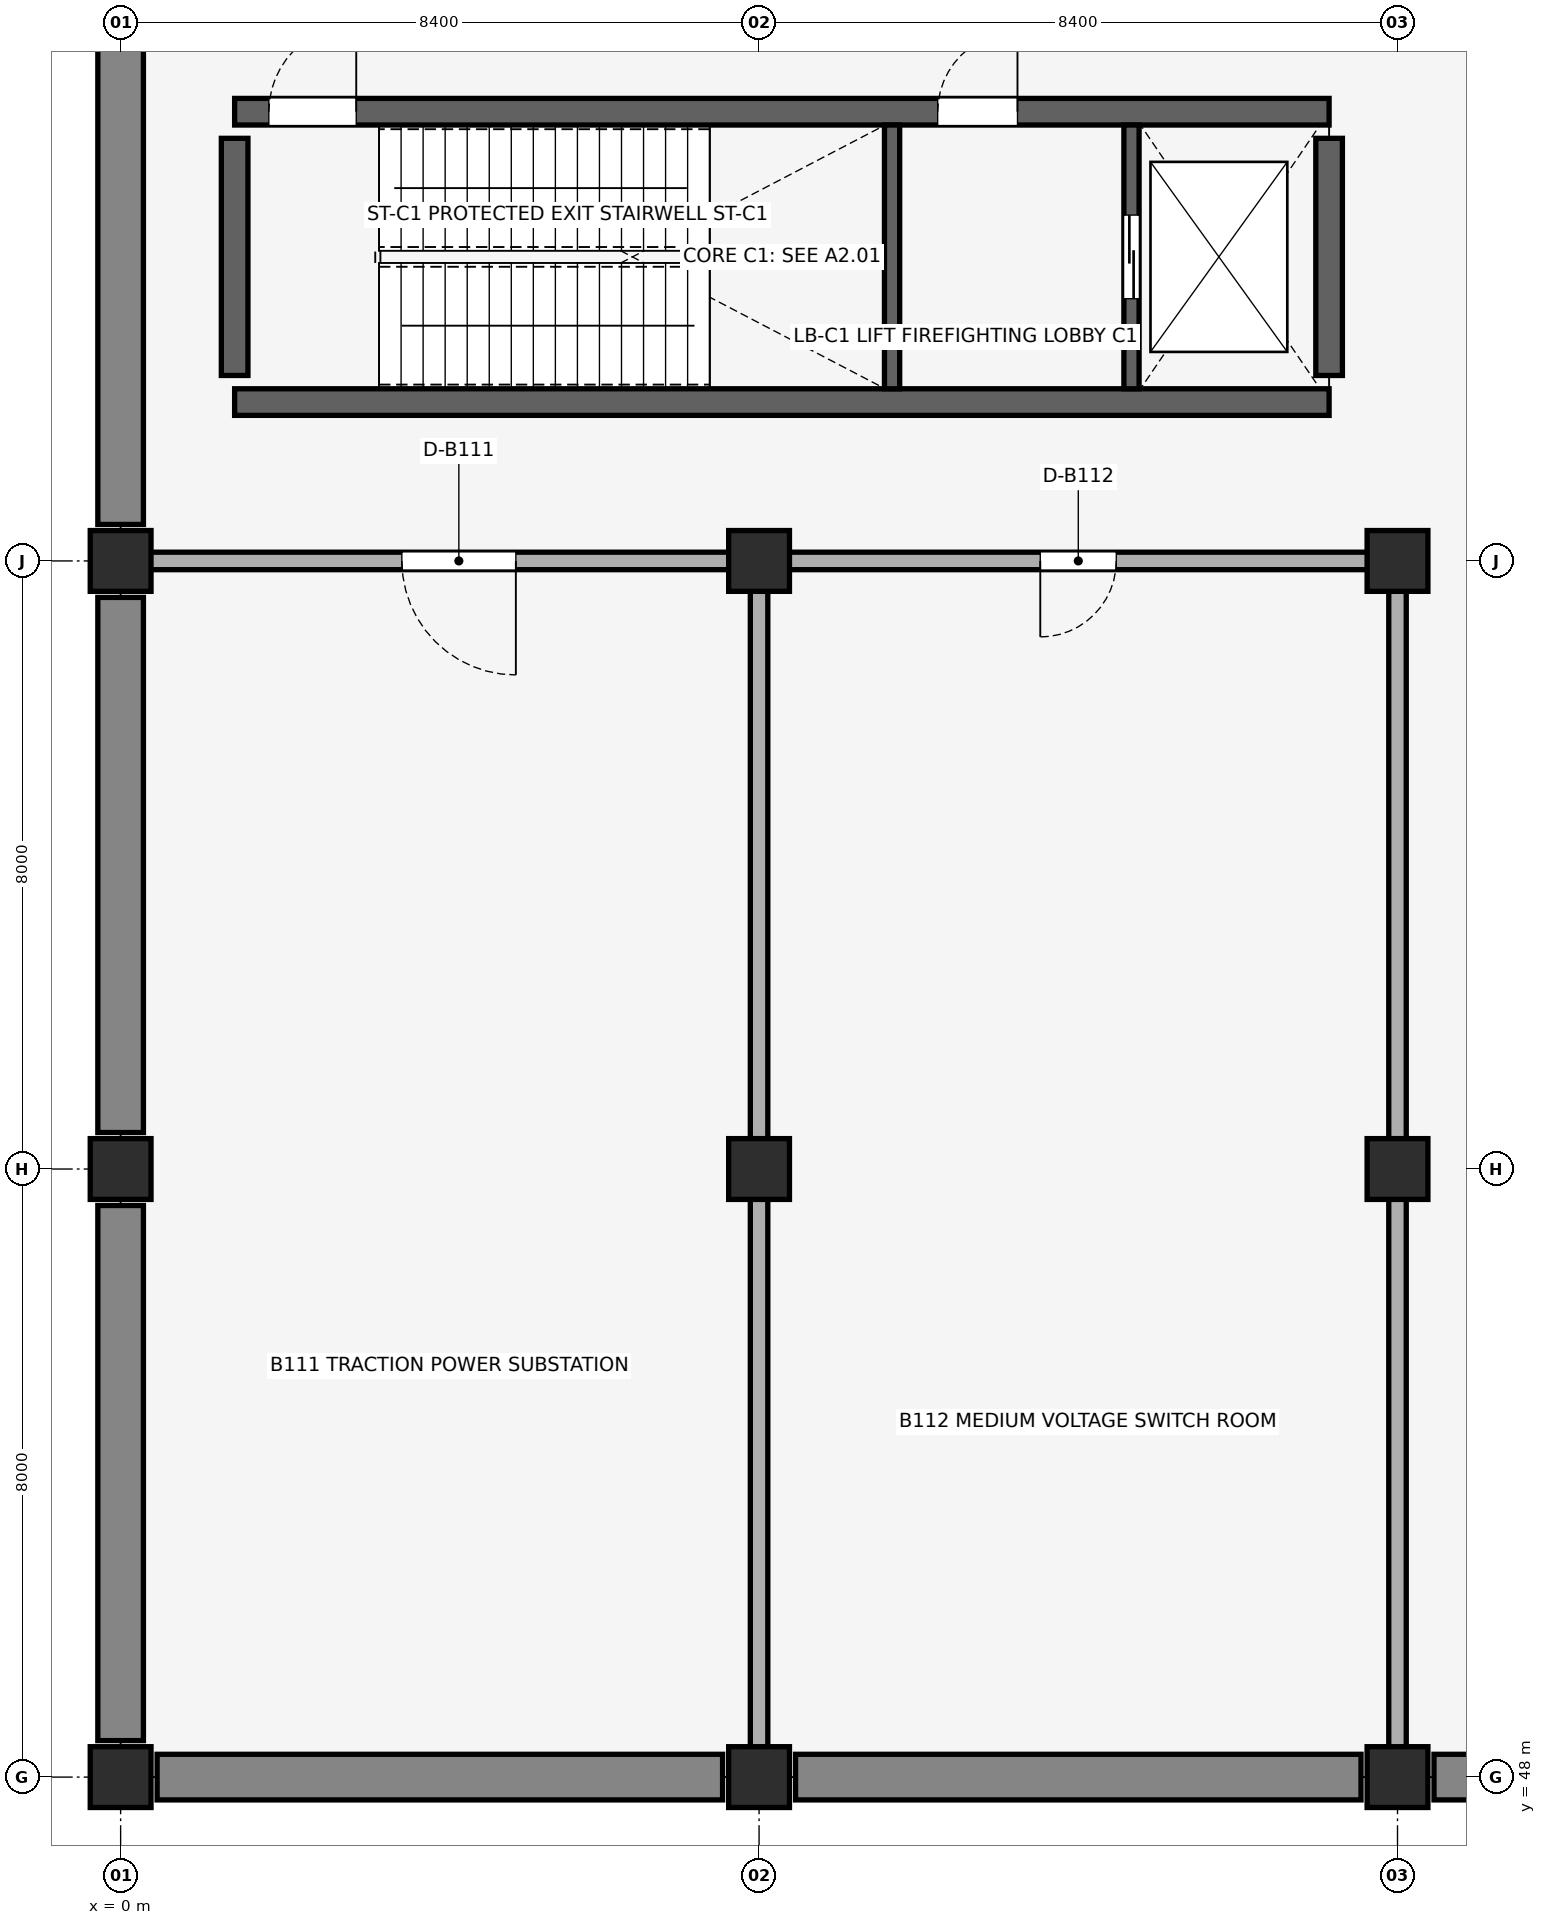
"""IFC4 building model, lengths in metres.
Left out: names, types, materials, properties, quantities, classifications, styles, units other than length and angle.
Written with IfcOpenShell. Run it as: python <this file> out.ifc"""

import sys

from ifc_helpers import new_model, si_unit, direction, frame, frame_2d, origin, origin_2d, place, context, subcontext, project, spatial, rectangle, extrude, element, fill, save


model = new_model("IFC4")
c1 = context("Model", 3, precision=1e-05, world=origin(), true_north=direction((0.0, 1.0)))
c2 = subcontext(c1, "Body", "Model", "MODEL_VIEW")
j1 = project(units=[si_unit("LENGTHUNIT", "METRE"), si_unit("PLANEANGLEUNIT", "RADIAN")], contexts=[c1])
p1 = place(None, origin())
s1 = spatial("IfcSite", under=j1, at=p1, CompositionType="ELEMENT")
p2 = place(p1, origin())
s2 = spatial("IfcBuilding", under=s1, at=p2, CompositionType="ELEMENT")
p3 = place(p2, frame((0.0, 0.0, -5.44)))
s3 = spatial("IfcBuildingStorey", under=s2, at=p3, CompositionType="ELEMENT", Elevation=-5.44)
p4 = place(p3, frame((0.48, 48.0, 0.0), z_axis=(0.0, 0.0, 1.0), x_axis=(1.0, 0.0, 0.0)))
e1 = element("IfcWall", 1, at=p4, inside=s3, PredefinedType="SOLIDWALL", context=c2, shape_type="SweptSolid", body=[
    extrude(rectangle(XDim=7.44, YDim=0.6, at=frame_2d((3.72, 0.0))), origin(), (0.0, 0.0, 1.0), 5.02),
])
p5 = place(p3, frame((8.88, 48.0, 0.0), z_axis=(0.0, 0.0, 1.0), x_axis=(1.0, 0.0, 0.0)))
e2 = element("IfcWall", 2, at=p5, inside=s3, PredefinedType="SOLIDWALL", context=c2, shape_type="SweptSolid", body=[
    extrude(rectangle(XDim=7.44, YDim=0.6, at=frame_2d((3.72, 0.0))), origin(), (0.0, 0.0, 1.0), 5.02),
])
p6 = place(p3, frame((17.28, 48.0, 0.0), z_axis=(0.0, 0.0, 1.0), x_axis=(1.0, 0.0, 0.0)))
e3 = element("IfcWall", 3, at=p6, inside=s3, PredefinedType="SOLIDWALL", context=c2, shape_type="SweptSolid", body=[
    extrude(rectangle(XDim=7.44, YDim=0.6, at=frame_2d((3.72, 0.0))), origin(), (0.0, 0.0, 1.0), 5.02),
])
for number, where, z_axis, x_axis in (
    (4, (0.0, 48.48, 0.0), (0.0, 0.0, 1.0), (0.0, 1.0, 0.0)),
    (5, (0.0, 56.48, 0.0), (0.0, 0.0, 1.0), (0.0, 1.0, 0.0)),
    (6, (0.0, 64.48, 0.0), (0.0, 0.0, 1.0), (0.0, 1.0, 0.0)),
):
    element("IfcWall", number, at=place(p3, frame(where, z_axis=z_axis, x_axis=x_axis)), inside=s3, PredefinedType="SOLIDWALL", context=c2, shape_type="SweptSolid", body=[
        extrude(rectangle(XDim=7.04, YDim=0.6, at=frame_2d((3.52, 0.0))), origin(), (0.0, 0.0, 1.0), 5.02),
    ])
p7 = place(p3, frame((1.5, 66.09, 0.0), z_axis=(0.0, 0.0, 1.0), x_axis=(1.0, 0.0, 0.0)))
e7 = element("IfcWall", 7, at=p7, inside=s3, PredefinedType="SHEAR", context=c2, shape_type="SweptSolid", body=[
    extrude(rectangle(XDim=14.4, YDim=0.35, at=frame_2d((7.2, 0.0))), origin(), (0.0, 0.0, 1.0), 5.02),
])
p8 = place(p3, frame((1.5, 69.91, 0.0), z_axis=(0.0, 0.0, 1.0), x_axis=(1.0, 0.0, 0.0)))
e8 = element("IfcWall", 8, at=p8, inside=s3, PredefinedType="SHEAR", context=c2, shape_type="SweptSolid", body=[
    extrude(rectangle(XDim=14.4, YDim=0.35, at=frame_2d((7.2, 0.0))), origin(), (0.0, 0.0, 1.0), 5.02),
])
p9 = place(p8, frame((0.45, 0.0, 0.0), z_axis=(0.0, 0.0, 1.0), x_axis=(1.0, 0.0, 0.0)))
e9 = element("IfcOpeningElement", 9, at=p9, cuts=e8, PredefinedType="OPENING", context=c2, shape_type="SweptSolid", body=[
    extrude(rectangle(XDim=1.15, YDim=2.15, at=frame_2d((0.575, 1.075))), frame((0.0, 0.185, 0.0), z_axis=(0.0, -1.0, 0.0), x_axis=(1.0, 0.0, 0.0)), (0.0, 0.0, 1.0), 0.37),
])
p10 = place(p8, frame((9.25, 0.0, 0.0), z_axis=(0.0, 0.0, 1.0), x_axis=(1.0, 0.0, 0.0)))
e10 = element("IfcOpeningElement", 10, at=p10, cuts=e8, PredefinedType="OPENING", context=c2, shape_type="SweptSolid", body=[
    extrude(rectangle(XDim=1.05, YDim=2.15, at=frame_2d((0.525, 1.075))), frame((0.0, 0.185, 0.0), z_axis=(0.0, -1.0, 0.0), x_axis=(1.0, 0.0, 0.0)), (0.0, 0.0, 1.0), 0.37),
])
for number, where, z_axis, x_axis in (
    (11, (1.5, 66.44, 0.0), (0.0, 0.0, 1.0), (0.0, 1.0, 0.0)),
    (12, (15.9, 66.44, 0.0), (0.0, 0.0, 1.0), (0.0, 1.0, 0.0)),
):
    element("IfcWall", number, at=place(p3, frame(where, z_axis=z_axis, x_axis=x_axis)), inside=s3, PredefinedType="SHEAR", context=c2, shape_type="SweptSolid", body=[
        extrude(rectangle(XDim=3.12, YDim=0.35, at=frame_2d((1.56, 0.0))), origin(), (0.0, 0.0, 1.0), 5.02),
    ])
for number, where, z_axis, x_axis in (
    (13, (0.0, 48.0, 0.0), (0.0, 0.0, 1.0), (1.0, 0.0, 0.0)),
    (14, (0.0, 56.0, 0.0), (0.0, 0.0, 1.0), (1.0, 0.0, 0.0)),
    (15, (0.0, 64.0, 0.0), (0.0, 0.0, 1.0), (1.0, 0.0, 0.0)),
    (16, (8.4, 48.0, 0.0), (0.0, 0.0, 1.0), (1.0, 0.0, 0.0)),
    (17, (8.4, 56.0, 0.0), (0.0, 0.0, 1.0), (1.0, 0.0, 0.0)),
    (18, (8.4, 64.0, 0.0), (0.0, 0.0, 1.0), (1.0, 0.0, 0.0)),
    (19, (16.8, 48.0, 0.0), (0.0, 0.0, 1.0), (1.0, 0.0, 0.0)),
    (20, (16.8, 56.0, 0.0), (0.0, 0.0, 1.0), (1.0, 0.0, 0.0)),
    (21, (16.8, 64.0, 0.0), (0.0, 0.0, 1.0), (1.0, 0.0, 0.0)),
):
    element("IfcColumn", number, at=place(p3, frame(where, z_axis=z_axis, x_axis=x_axis)), inside=s3, PredefinedType="COLUMN", context=c2, shape_type="SweptSolid", body=[
        extrude(rectangle(XDim=0.8, YDim=0.8, at=origin_2d()), origin(), (0.0, 0.0, 1.0), 5.02),
    ])
p11 = place(p3, frame((10.15, 66.265, 0.0), z_axis=(0.0, 0.0, 1.0), x_axis=(0.0, 1.0, 0.0)))
e22 = element("IfcWall", 22, at=p11, inside=s3, PredefinedType="SHEAR", context=c2, shape_type="SweptSolid", body=[
    extrude(rectangle(XDim=3.47, YDim=0.2, at=frame_2d((1.735, 0.0))), origin(), (0.0, 0.0, 1.0), 5.02),
])
p12 = place(p3, frame((13.3, 66.265, 0.0), z_axis=(0.0, 0.0, 1.0), x_axis=(0.0, 1.0, 0.0)))
e23 = element("IfcWall", 23, at=p12, inside=s3, PredefinedType="SHEAR", context=c2, shape_type="SweptSolid", body=[
    extrude(rectangle(XDim=3.47, YDim=0.2, at=frame_2d((1.735, 0.0))), origin(), (0.0, 0.0, 1.0), 5.02),
])
p13 = place(p12, frame((1.185, 0.0, 0.0), z_axis=(0.0, 0.0, 1.0), x_axis=(1.0, 0.0, 0.0)))
e24 = element("IfcOpeningElement", 24, at=p13, cuts=e23, PredefinedType="OPENING", context=c2, shape_type="SweptSolid", body=[
    extrude(rectangle(XDim=1.1, YDim=2.15, at=frame_2d((0.55, 1.075))), frame((0.0, 0.11, 0.0), z_axis=(0.0, -1.0, 0.0), x_axis=(1.0, 0.0, 0.0)), (0.0, 0.0, 1.0), 0.22),
])
p14 = place(p3, frame((0.39, 64.0, 0.0), z_axis=(0.0, 0.0, 1.0), x_axis=(1.0, 0.0, 0.0)))
e25 = element("IfcWall", 25, at=p14, inside=s3, PredefinedType="PARTITIONING", context=c2, shape_type="SweptSolid", body=[
    extrude(rectangle(XDim=7.62, YDim=0.23, at=frame_2d((3.81, 0.0))), origin(), (0.0, 0.0, 1.0), 4.17),
])
p15 = place(p14, frame((4.81, 0.0, 0.0), z_axis=(0.0, 0.0, 1.0), x_axis=(-1.0, 0.0, 0.0)))
e26 = element("IfcOpeningElement", 26, at=p15, cuts=e25, PredefinedType="OPENING", context=c2, shape_type="SweptSolid", body=[
    extrude(rectangle(XDim=1.5, YDim=2.2, at=frame_2d((0.75, 1.1))), frame((0.0, 0.125, 0.0), z_axis=(0.0, -1.0, 0.0), x_axis=(1.0, 0.0, 0.0)), (0.0, 0.0, 1.0), 0.25),
])
p16 = place(p3, frame((8.79, 64.0, 0.0), z_axis=(0.0, 0.0, 1.0), x_axis=(1.0, 0.0, 0.0)))
e27 = element("IfcWall", 27, at=p16, inside=s3, PredefinedType="PARTITIONING", context=c2, shape_type="SweptSolid", body=[
    extrude(rectangle(XDim=7.62, YDim=0.23, at=frame_2d((3.81, 0.0))), origin(), (0.0, 0.0, 1.0), 4.17),
])
p17 = place(p16, frame((4.31, 0.0, 0.0), z_axis=(0.0, 0.0, 1.0), x_axis=(-1.0, 0.0, 0.0)))
e28 = element("IfcOpeningElement", 28, at=p17, cuts=e27, PredefinedType="OPENING", context=c2, shape_type="SweptSolid", body=[
    extrude(rectangle(XDim=1.0, YDim=2.15, at=frame_2d((0.5, 1.075))), frame((0.0, 0.125, 0.0), z_axis=(0.0, -1.0, 0.0), x_axis=(1.0, 0.0, 0.0)), (0.0, 0.0, 1.0), 0.25),
])
p18 = place(p3, frame((8.4, 48.39, 0.0), z_axis=(0.0, 0.0, 1.0), x_axis=(0.0, 1.0, 0.0)))
e29 = element("IfcWall", 29, at=p18, inside=s3, PredefinedType="PARTITIONING", context=c2, shape_type="SweptSolid", body=[
    extrude(rectangle(XDim=7.22, YDim=0.23, at=frame_2d((3.61, 0.0))), origin(), (0.0, 0.0, 1.0), 4.27),
])
p19 = place(p3, frame((8.4, 56.39, 0.0), z_axis=(0.0, 0.0, 1.0), x_axis=(0.0, 1.0, 0.0)))
e30 = element("IfcWall", 30, at=p19, inside=s3, PredefinedType="PARTITIONING", context=c2, shape_type="SweptSolid", body=[
    extrude(rectangle(XDim=7.22, YDim=0.23, at=frame_2d((3.61, 0.0))), origin(), (0.0, 0.0, 1.0), 4.37),
])
p20 = place(p3, frame((16.8, 48.39, 0.0), z_axis=(0.0, 0.0, 1.0), x_axis=(0.0, 1.0, 0.0)))
e31 = element("IfcWall", 31, at=p20, inside=s3, PredefinedType="PARTITIONING", context=c2, shape_type="SweptSolid", body=[
    extrude(rectangle(XDim=7.22, YDim=0.23, at=frame_2d((3.61, 0.0))), origin(), (0.0, 0.0, 1.0), 4.27),
])
p21 = place(p3, frame((16.8, 56.39, 0.0), z_axis=(0.0, 0.0, 1.0), x_axis=(0.0, 1.0, 0.0)))
e32 = element("IfcWall", 32, at=p21, inside=s3, PredefinedType="PARTITIONING", context=c2, shape_type="SweptSolid", body=[
    extrude(rectangle(XDim=7.22, YDim=0.23, at=frame_2d((3.61, 0.0))), origin(), (0.0, 0.0, 1.0), 4.37),
])
p22 = place(p9, origin())
e33 = element("IfcDoor", 33, at=p22, inside=s3, OperationType="SINGLE_SWING_RIGHT", PredefinedType="DOOR", context=c2, shape_type="SweptSolid", body=[
    extrude(rectangle(XDim=1.15, YDim=2.15, at=frame_2d((0.575, 1.075))), frame((0.0, 0.025, 0.0), z_axis=(0.0, -1.0, 0.0), x_axis=(1.0, 0.0, 0.0)), (0.0, 0.0, 1.0), 0.05),
])
fill(e9, e33)
p23 = place(p10, origin())
e34 = element("IfcDoor", 34, at=p23, inside=s3, OperationType="SINGLE_SWING_RIGHT", PredefinedType="DOOR", context=c2, shape_type="SweptSolid", body=[
    extrude(rectangle(XDim=1.05, YDim=2.15, at=frame_2d((0.525, 1.075))), frame((0.0, 0.025, 0.0), z_axis=(0.0, -1.0, 0.0), x_axis=(1.0, 0.0, 0.0)), (0.0, 0.0, 1.0), 0.05),
])
fill(e10, e34)
p24 = place(p13, origin())
e35 = element("IfcDoor", 35, at=p24, inside=s3, OperationType="DOUBLE_DOOR_SLIDING", PredefinedType="DOOR", context=c2, shape_type="SweptSolid", body=[
    extrude(rectangle(XDim=1.1, YDim=2.15, at=frame_2d((0.55, 1.075))), frame((0.0, 0.025, 0.0), z_axis=(0.0, -1.0, 0.0), x_axis=(1.0, 0.0, 0.0)), (0.0, 0.0, 1.0), 0.05),
])
fill(e24, e35)
p25 = place(p15, origin())
e36 = element("IfcDoor", 36, at=p25, inside=s3, OperationType="SINGLE_SWING_LEFT", PredefinedType="DOOR", context=c2, shape_type="SweptSolid", body=[
    extrude(rectangle(XDim=1.5, YDim=2.2, at=frame_2d((0.75, 1.1))), frame((0.0, 0.025, 0.0), z_axis=(0.0, -1.0, 0.0), x_axis=(1.0, 0.0, 0.0)), (0.0, 0.0, 1.0), 0.05),
])
fill(e26, e36)
p26 = place(p17, origin())
e37 = element("IfcDoor", 37, at=p26, inside=s3, OperationType="SINGLE_SWING_RIGHT", PredefinedType="DOOR", context=c2, shape_type="SweptSolid", body=[
    extrude(rectangle(XDim=1.0, YDim=2.15, at=frame_2d((0.5, 1.075))), frame((0.0, 0.025, 0.0), z_axis=(0.0, -1.0, 0.0), x_axis=(1.0, 0.0, 0.0)), (0.0, 0.0, 1.0), 0.05),
])
fill(e28, e37)
save(model, sys.argv[1])
